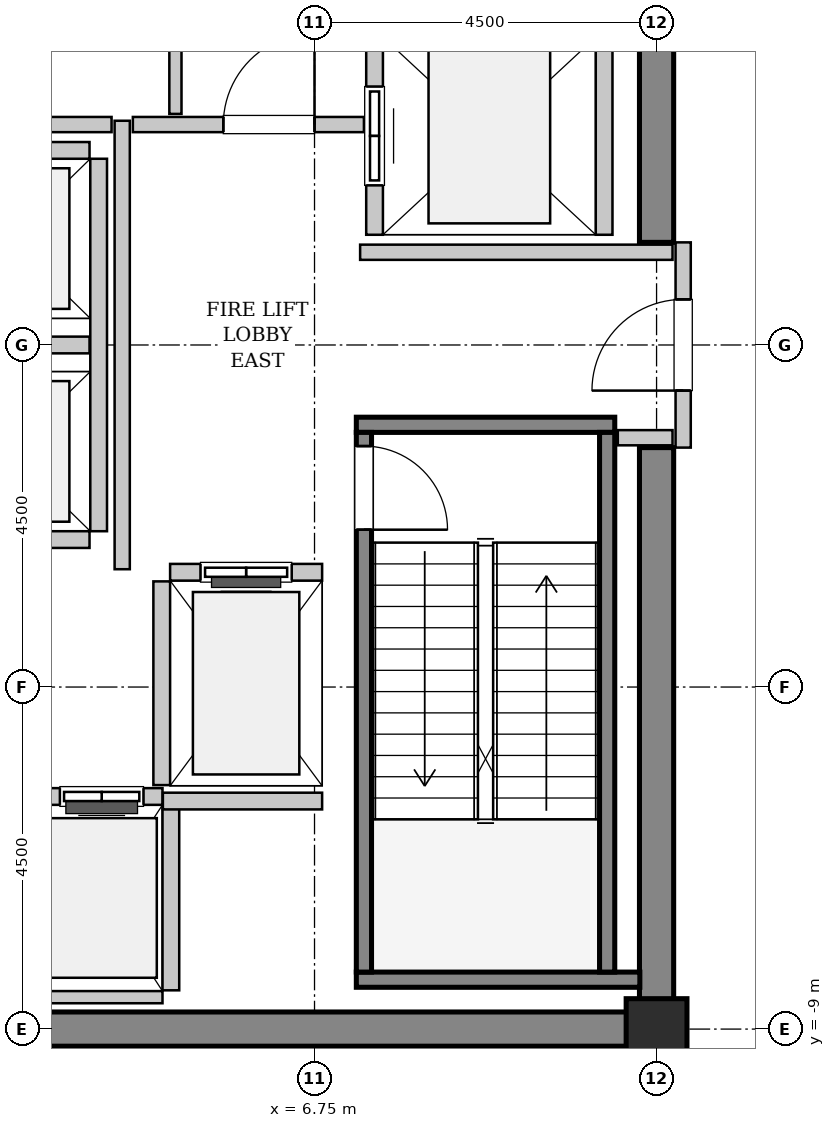
"""IFC4 building model, lengths in metres.
Left out: names, types, materials, properties, quantities, classifications, styles, units other than length and angle.
Written with IfcOpenShell. Run it as: python <this file> out.ifc"""

import sys

from ifc_helpers import new_model, si_unit, direction, frame, frame_2d, origin, origin_2d, place, context, subcontext, project, spatial, rectangle, hollow_rectangle, extrude, source, transform, mapped, element, fill, save


model = new_model("IFC4")
c1 = context("Model", 3, precision=1e-05, world=origin(), true_north=direction((0.0, 1.0)))
c2 = subcontext(c1, "Body", "Model", "MODEL_VIEW")
j1 = project(units=[si_unit("LENGTHUNIT", "METRE"), si_unit("PLANEANGLEUNIT", "RADIAN")], contexts=[c1])
p1 = place(None, origin())
s1 = spatial("IfcSite", under=j1, at=p1, CompositionType="ELEMENT")
p2 = place(p1, origin())
s2 = spatial("IfcBuilding", under=s1, at=p2, CompositionType="ELEMENT")
p3 = place(p2, frame((0.0, 0.0, 259.8)))
s3 = spatial("IfcBuildingStorey", under=s2, at=p3, CompositionType="ELEMENT", Elevation=259.8)
m1 = source(origin(), c2, "Body", "SweptSolid", [
    extrude(rectangle(XDim=9.925, YDim=0.45, at=frame_2d((4.962, 0.0))), origin(), (0.0, 0.0, 1.0), 4.8),
])
p4 = place(p3, frame((1.55, -9.0, 0.0), z_axis=(0.0, 0.0, 1.0), x_axis=(1.0, 0.0, 0.0)))
e1 = element("IfcWall", 1, at=p4, inside=s3, PredefinedType="SHEAR", context=c2, shape_type="MappedRepresentation", body=[
    mapped(m1, transform((0.0, 0.0, 0.0), x_axis=(1.0, 0.0, 0.0), y_axis=(0.0, 1.0, 0.0), z_axis=(0.0, 0.0, 1.0), scale=1.0)),
])
m2 = source(origin(), c2, "Body", "SweptSolid", [
    extrude(rectangle(XDim=7.425, YDim=0.45, at=frame_2d((3.712, 0.0))), origin(), (0.0, 0.0, 1.0), 4.8),
])
for number, where, z_axis, x_axis in (
    (2, (11.25, -8.775, 0.0), (0.0, 0.0, 1.0), (0.0, 1.0, 0.0)),
    (3, (11.25, 1.35, 0.0), (0.0, 0.0, 1.0), (0.0, 1.0, 0.0)),
):
    element("IfcWall", number, at=place(p3, frame(where, z_axis=z_axis, x_axis=x_axis)), inside=s3, PredefinedType="SHEAR", context=c2, shape_type="MappedRepresentation", body=[
        mapped(m2, transform((0.0, 0.0, 0.0), x_axis=(1.0, 0.0, 0.0), y_axis=(0.0, 1.0, 0.0), z_axis=(0.0, 0.0, 1.0), scale=1.0)),
    ])
m3 = source(origin(), c2, "Body", "SweptSolid", [
    extrude(hollow_rectangle(XDim=0.8, YDim=0.8, WallThickness=0.04, InnerFilletRadius=0.04, OuterFilletRadius=0.08, at=origin_2d()), origin(), (0.0, 0.0, 1.0), 4.8),
])
p5 = place(p3, frame((11.25, -9.0, 0.0), z_axis=(0.0, 0.0, 1.0), x_axis=(1.0, 0.0, 0.0)))
e4 = element("IfcColumn", 4, at=p5, inside=s3, PredefinedType="COLUMN", context=c2, shape_type="MappedRepresentation", body=[
    mapped(m3, transform((0.0, 0.0, 0.0), x_axis=(1.0, 0.0, 0.0), y_axis=(0.0, 1.0, 0.0), z_axis=(0.0, 0.0, 1.0), scale=1.0)),
])
m4 = source(origin(), c2, "Body", "SweptSolid", [
    extrude(rectangle(XDim=3.4, YDim=0.2, at=frame_2d((1.7, 0.0))), origin(), (0.0, 0.0, 1.0), 4.8),
])
p6 = place(p3, frame((7.3, -1.05, 0.0), z_axis=(0.0, 0.0, 1.0), x_axis=(1.0, 0.0, 0.0)))
e5 = element("IfcWall", 5, at=p6, inside=s3, PredefinedType="SOLIDWALL", context=c2, shape_type="MappedRepresentation", body=[
    mapped(m4, transform((0.0, 0.0, 0.0), x_axis=(1.0, 0.0, 0.0), y_axis=(0.0, 1.0, 0.0), z_axis=(0.0, 0.0, 1.0), scale=1.0)),
])
m5 = source(origin(), c2, "Body", "SweptSolid", [
    extrude(rectangle(XDim=3.73, YDim=0.2, at=frame_2d((1.865, 0.0))), origin(), (0.0, 0.0, 1.0), 4.8),
])
p7 = place(p3, frame((7.3, -8.35, 0.0), z_axis=(0.0, 0.0, 1.0), x_axis=(1.0, 0.0, 0.0)))
e6 = element("IfcWall", 6, at=p7, inside=s3, PredefinedType="SOLIDWALL", context=c2, shape_type="MappedRepresentation", body=[
    mapped(m5, transform((0.0, 0.0, 0.0), x_axis=(1.0, 0.0, 0.0), y_axis=(0.0, 1.0, 0.0), z_axis=(0.0, 0.0, 1.0), scale=1.0)),
])
m6 = source(origin(), c2, "Body", "SweptSolid", [
    extrude(rectangle(XDim=7.1, YDim=0.2, at=frame_2d((3.55, 0.0))), origin(), (0.0, 0.0, 1.0), 4.8),
])
p8 = place(p3, frame((7.4, -1.15, 0.0), z_axis=(0.0, 0.0, 1.0), x_axis=(0.0, -1.0, 0.0)))
e7 = element("IfcWall", 7, at=p8, inside=s3, PredefinedType="SOLIDWALL", context=c2, shape_type="MappedRepresentation", body=[
    mapped(m6, transform((0.0, 0.0, 0.0), x_axis=(1.0, 0.0, 0.0), y_axis=(0.0, 1.0, 0.0), z_axis=(0.0, 0.0, 1.0), scale=1.0)),
])
p9 = place(p8, frame((0.18, 0.0, 0.0)))
e8 = element("IfcOpeningElement", 8, at=p9, cuts=e7, PredefinedType="OPENING", context=c2, shape_type="SweptSolid", body=[
    extrude(rectangle(XDim=1.1, YDim=2.15, at=frame_2d((0.55, 1.075))), frame((0.0, 0.11, 0.0), z_axis=(0.0, -1.0, 0.0), x_axis=(1.0, 0.0, 0.0)), (0.0, 0.0, 1.0), 0.22),
])
p10 = place(p3, frame((10.6, -1.15, 0.0), z_axis=(0.0, 0.0, 1.0), x_axis=(0.0, -1.0, 0.0)))
e9 = element("IfcWall", 9, at=p10, inside=s3, PredefinedType="SOLIDWALL", context=c2, shape_type="MappedRepresentation", body=[
    mapped(m6, transform((0.0, 0.0, 0.0), x_axis=(1.0, 0.0, 0.0), y_axis=(0.0, 1.0, 0.0), z_axis=(0.0, 0.0, 1.0), scale=1.0)),
])
m7 = source(origin(), c2, "Body", "SweptSolid", [
    extrude(rectangle(XDim=2.0, YDim=0.22, at=frame_2d((1.0, 0.0))), origin(), (0.0, 0.0, 1.0), 4.535),
])
p11 = place(p3, frame((6.85, -2.99, 0.0), z_axis=(0.0, 0.0, 1.0), x_axis=(-1.0, 0.0, 0.0)))
e10 = element("IfcWall", 10, at=p11, inside=s3, PredefinedType="SOLIDWALL", context=c2, shape_type="MappedRepresentation", body=[
    mapped(m7, transform((0.0, 0.0, 0.0), x_axis=(1.0, 0.0, 0.0), y_axis=(0.0, 1.0, 0.0), z_axis=(0.0, 0.0, 1.0), scale=1.0)),
])
p12 = place(p11, frame((0.4, 0.0, 0.0)))
e11 = element("IfcOpeningElement", 11, at=p12, cuts=e10, PredefinedType="OPENING", context=c2, shape_type="SweptSolid", body=[
    extrude(rectangle(XDim=1.2, YDim=2.2, at=frame_2d((0.6, 1.1))), frame((0.0, 0.12, 0.0), z_axis=(0.0, -1.0, 0.0), x_axis=(1.0, 0.0, 0.0)), (0.0, 0.0, 1.0), 0.24),
])
m8 = source(origin(), c2, "Body", "SweptSolid", [
    extrude(rectangle(XDim=2.68, YDim=0.22, at=frame_2d((1.34, 0.0))), origin(), (0.0, 0.0, 1.0), 4.535),
])
p13 = place(p3, frame((4.74, -3.11, 0.0), z_axis=(0.0, 0.0, 1.0), x_axis=(0.0, -1.0, 0.0)))
e12 = element("IfcWall", 12, at=p13, inside=s3, PredefinedType="SOLIDWALL", context=c2, shape_type="MappedRepresentation", body=[
    mapped(m8, transform((0.0, 0.0, 0.0), x_axis=(1.0, 0.0, 0.0), y_axis=(0.0, 1.0, 0.0), z_axis=(0.0, 0.0, 1.0), scale=1.0)),
])
m9 = source(origin(), c2, "Body", "SweptSolid", [
    extrude(rectangle(XDim=5.45, YDim=0.22, at=frame_2d((2.725, 0.0))), origin(), (0.0, 0.0, 1.0), 4.535),
])
p14 = place(p3, frame((7.54, 6.9, 0.0), z_axis=(0.0, 0.0, 1.0), x_axis=(0.0, -1.0, 0.0)))
e13 = element("IfcWall", 13, at=p14, inside=s3, PredefinedType="SOLIDWALL", context=c2, shape_type="MappedRepresentation", body=[
    mapped(m9, transform((0.0, 0.0, 0.0), x_axis=(1.0, 0.0, 0.0), y_axis=(0.0, 1.0, 0.0), z_axis=(0.0, 0.0, 1.0), scale=1.0)),
])
p15 = place(p14, frame((3.5, 0.0, 0.0)))
e14 = element("IfcOpeningElement", 14, at=p15, cuts=e13, PredefinedType="OPENING", context=c2, shape_type="SweptSolid", body=[
    extrude(rectangle(XDim=1.3, YDim=2.3, at=frame_2d((0.65, 1.15))), frame((0.0, 0.12, 0.0), z_axis=(0.0, -1.0, 0.0), x_axis=(1.0, 0.0, 0.0)), (0.0, 0.0, 1.0), 0.24),
])
p16 = place(p14, frame((0.65, 0.0, 0.0)))
e15 = element("IfcOpeningElement", 15, at=p16, cuts=e13, PredefinedType="OPENING", context=c2, shape_type="SweptSolid", body=[
    extrude(rectangle(XDim=1.3, YDim=2.3, at=frame_2d((0.65, 1.15))), frame((0.0, 0.12, 0.0), z_axis=(0.0, -1.0, 0.0), x_axis=(1.0, 0.0, 0.0)), (0.0, 0.0, 1.0), 0.24),
])
p17 = place(p3, frame((10.56, 1.45, 0.0), z_axis=(0.0, 0.0, 1.0), x_axis=(0.0, 1.0, 0.0)))
e16 = element("IfcWall", 16, at=p17, inside=s3, PredefinedType="SOLIDWALL", context=c2, shape_type="MappedRepresentation", body=[
    mapped(m9, transform((0.0, 0.0, 0.0), x_axis=(1.0, 0.0, 0.0), y_axis=(0.0, 1.0, 0.0), z_axis=(0.0, 0.0, 1.0), scale=1.0)),
])
m10 = source(origin(), c2, "Body", "SweptSolid", [
    extrude(rectangle(XDim=3.2, YDim=0.22, at=frame_2d((1.6, 0.0))), origin(), (0.0, 0.0, 1.0), 4.535),
])
p18 = place(p3, frame((4.75, -5.94, 0.0), z_axis=(0.0, 0.0, 1.0), x_axis=(-1.0, 0.0, 0.0)))
e17 = element("IfcWall", 17, at=p18, inside=s3, PredefinedType="SOLIDWALL", context=c2, shape_type="MappedRepresentation", body=[
    mapped(m10, transform((0.0, 0.0, 0.0), x_axis=(1.0, 0.0, 0.0), y_axis=(0.0, 1.0, 0.0), z_axis=(0.0, 0.0, 1.0), scale=1.0)),
])
p19 = place(p18, frame((1.875, 0.0, 0.0)))
e18 = element("IfcOpeningElement", 18, at=p19, cuts=e17, PredefinedType="OPENING", context=c2, shape_type="SweptSolid", body=[
    extrude(rectangle(XDim=1.1, YDim=2.2, at=frame_2d((0.55, 1.1))), frame((0.0, 0.12, 0.0), z_axis=(0.0, -1.0, 0.0), x_axis=(1.0, 0.0, 0.0)), (0.0, 0.0, 1.0), 0.24),
])
p20 = place(p18, frame((0.25, 0.0, 0.0)))
e19 = element("IfcOpeningElement", 19, at=p20, cuts=e17, PredefinedType="OPENING", context=c2, shape_type="SweptSolid", body=[
    extrude(rectangle(XDim=1.1, YDim=2.2, at=frame_2d((0.55, 1.1))), frame((0.0, 0.12, 0.0), z_axis=(0.0, -1.0, 0.0), x_axis=(1.0, 0.0, 0.0)), (0.0, 0.0, 1.0), 0.24),
])
m11 = source(origin(), c2, "Body", "SweptSolid", [
    extrude(rectangle(XDim=3.2, YDim=0.16, at=frame_2d((1.6, 0.0))), origin(), (0.0, 0.0, 1.0), 3.625),
])
p21 = place(p3, frame((1.55, -8.58, 0.0), z_axis=(0.0, 0.0, 1.0), x_axis=(1.0, 0.0, 0.0)))
e20 = element("IfcWall", 20, at=p21, inside=s3, PredefinedType="PARTITIONING", context=c2, shape_type="MappedRepresentation", body=[
    mapped(m11, transform((0.0, 0.0, 0.0), x_axis=(1.0, 0.0, 0.0), y_axis=(0.0, 1.0, 0.0), z_axis=(0.0, 0.0, 1.0), scale=1.0)),
])
m12 = source(origin(), c2, "Body", "SweptSolid", [
    extrude(rectangle(XDim=2.43, YDim=0.22, at=frame_2d((1.215, 0.0))), origin(), (0.0, 0.0, 1.0), 4.535),
])
p22 = place(p3, frame((4.86, -8.49, 0.0), z_axis=(0.0, 0.0, 1.0), x_axis=(0.0, 1.0, 0.0)))
e21 = element("IfcWall", 21, at=p22, inside=s3, PredefinedType="SOLIDWALL", context=c2, shape_type="MappedRepresentation", body=[
    mapped(m12, transform((0.0, 0.0, 0.0), x_axis=(1.0, 0.0, 0.0), y_axis=(0.0, 1.0, 0.0), z_axis=(0.0, 0.0, 1.0), scale=1.0)),
])
m13 = source(origin(), c2, "Body", "SweptSolid", [
    extrude(rectangle(XDim=4.9, YDim=0.22, at=frame_2d((2.45, 0.0))), origin(), (0.0, 0.0, 1.0), 4.535),
])
p23 = place(p3, frame((3.91, -2.45, 0.0), z_axis=(0.0, 0.0, 1.0), x_axis=(0.0, 1.0, 0.0)))
e22 = element("IfcWall", 22, at=p23, inside=s3, PredefinedType="SOLIDWALL", context=c2, shape_type="MappedRepresentation", body=[
    mapped(m13, transform((0.0, 0.0, 0.0), x_axis=(1.0, 0.0, 0.0), y_axis=(0.0, 1.0, 0.0), z_axis=(0.0, 0.0, 1.0), scale=1.0)),
])
m14 = source(origin(), c2, "Body", "SweptSolid", [
    extrude(rectangle(XDim=2.13, YDim=0.22, at=frame_2d((1.065, 0.0))), origin(), (0.0, 0.0, 1.0), 4.535),
])
for number, where, z_axis, x_axis in (
    (23, (1.66, -2.56, 0.0), (0.0, 0.0, 1.0), (1.0, 0.0, 0.0)),
    (24, (1.66, 0.0, 0.0), (0.0, 0.0, 1.0), (1.0, 0.0, 0.0)),
    (25, (3.79, 2.56, 0.0), (0.0, 0.0, 1.0), (-1.0, 0.0, 0.0)),
):
    element("IfcWall", number, at=place(p3, frame(where, z_axis=z_axis, x_axis=x_axis)), inside=s3, PredefinedType="SOLIDWALL", context=c2, shape_type="MappedRepresentation", body=[
        mapped(m14, transform((0.0, 0.0, 0.0), x_axis=(1.0, 0.0, 0.0), y_axis=(0.0, 1.0, 0.0), z_axis=(0.0, 0.0, 1.0), scale=1.0)),
    ])
m15 = source(origin(), c2, "Body", "SweptSolid", [
    extrude(rectangle(XDim=2.095, YDim=0.22, at=frame_2d((1.048, 0.0))), origin(), (0.0, 0.0, 1.0), 4.535),
])
p24 = place(p3, frame((4.755, -6.0, 0.0), z_axis=(0.0, 0.0, 1.0), x_axis=(1.0, 0.0, 0.0)))
e26 = element("IfcWall", 26, at=p24, inside=s3, PredefinedType="SOLIDWALL", context=c2, shape_type="MappedRepresentation", body=[
    mapped(m15, transform((0.0, 0.0, 0.0), x_axis=(1.0, 0.0, 0.0), y_axis=(0.0, 1.0, 0.0), z_axis=(0.0, 0.0, 1.0), scale=1.0)),
])
m16 = source(origin(), c2, "Body", "SweptSolid", [
    extrude(rectangle(XDim=2.7, YDim=0.2, at=frame_2d((1.35, 0.0))), origin(), (0.0, 0.0, 1.0), 3.625),
])
p25 = place(p3, frame((11.6, -1.35, 0.0), z_axis=(0.0, 0.0, 1.0), x_axis=(0.0, 1.0, 0.0)))
e27 = element("IfcWall", 27, at=p25, inside=s3, PredefinedType="PARTITIONING", context=c2, shape_type="MappedRepresentation", body=[
    mapped(m16, transform((0.0, 0.0, 0.0), x_axis=(1.0, 0.0, 0.0), y_axis=(0.0, 1.0, 0.0), z_axis=(0.0, 0.0, 1.0), scale=1.0)),
])
p26 = place(p25, frame((0.75, 0.0, 0.0)))
e28 = element("IfcOpeningElement", 28, at=p26, cuts=e27, PredefinedType="OPENING", context=c2, shape_type="SweptSolid", body=[
    extrude(rectangle(XDim=1.2, YDim=2.15, at=frame_2d((0.6, 1.075))), frame((0.0, 0.11, 0.0), z_axis=(0.0, -1.0, 0.0), x_axis=(1.0, 0.0, 0.0)), (0.0, 0.0, 1.0), 0.22),
])
m17 = source(origin(), c2, "Body", "SweptSolid", [
    extrude(rectangle(XDim=5.9, YDim=0.2, at=frame_2d((2.95, 0.0))), origin(), (0.0, 0.0, 1.0), 4.535),
])
p27 = place(p3, frame((4.22, -2.95, 0.0), z_axis=(0.0, 0.0, 1.0), x_axis=(0.0, 1.0, 0.0)))
e29 = element("IfcWall", 29, at=p27, inside=s3, PredefinedType="PARTITIONING", context=c2, shape_type="MappedRepresentation", body=[
    mapped(m17, transform((0.0, 0.0, 0.0), x_axis=(1.0, 0.0, 0.0), y_axis=(0.0, 1.0, 0.0), z_axis=(0.0, 0.0, 1.0), scale=1.0)),
])
m18 = source(origin(), c2, "Body", "SweptSolid", [
    extrude(rectangle(XDim=2.52, YDim=0.2, at=frame_2d((1.26, 0.0))), origin(), (0.0, 0.0, 1.0), 4.535),
])
p28 = place(p3, frame((1.56, 2.9, 0.0), z_axis=(0.0, 0.0, 1.0), x_axis=(1.0, 0.0, 0.0)))
e30 = element("IfcWall", 30, at=p28, inside=s3, PredefinedType="PARTITIONING", context=c2, shape_type="MappedRepresentation", body=[
    mapped(m18, transform((0.0, 0.0, 0.0), x_axis=(1.0, 0.0, 0.0), y_axis=(0.0, 1.0, 0.0), z_axis=(0.0, 0.0, 1.0), scale=1.0)),
])
m19 = source(origin(), c2, "Body", "SweptSolid", [
    extrude(rectangle(XDim=3.04, YDim=0.2, at=frame_2d((1.52, 0.0))), origin(), (0.0, 0.0, 1.0), 4.535),
])
p29 = place(p3, frame((4.36, 2.9, 0.0), z_axis=(0.0, 0.0, 1.0), x_axis=(1.0, 0.0, 0.0)))
e31 = element("IfcWall", 31, at=p29, inside=s3, PredefinedType="PARTITIONING", context=c2, shape_type="MappedRepresentation", body=[
    mapped(m19, transform((0.0, 0.0, 0.0), x_axis=(1.0, 0.0, 0.0), y_axis=(0.0, 1.0, 0.0), z_axis=(0.0, 0.0, 1.0), scale=1.0)),
])
p30 = place(p29, frame((1.19, 0.0, 0.0)))
e32 = element("IfcOpeningElement", 32, at=p30, cuts=e31, PredefinedType="OPENING", context=c2, shape_type="SweptSolid", body=[
    extrude(rectangle(XDim=1.2, YDim=2.15, at=frame_2d((0.6, 1.075))), frame((0.0, 0.11, 0.0), z_axis=(0.0, -1.0, 0.0), x_axis=(1.0, 0.0, 0.0)), (0.0, 0.0, 1.0), 0.22),
])
m20 = source(origin(), c2, "Body", "SweptSolid", [
    extrude(rectangle(XDim=4.11, YDim=0.2, at=frame_2d((2.055, 0.0))), origin(), (0.0, 0.0, 1.0), 4.535),
])
p31 = place(p3, frame((7.35, 1.22, 0.0), z_axis=(0.0, 0.0, 1.0), x_axis=(1.0, 0.0, 0.0)))
e33 = element("IfcWall", 33, at=p31, inside=s3, PredefinedType="PARTITIONING", context=c2, shape_type="MappedRepresentation", body=[
    mapped(m20, transform((0.0, 0.0, 0.0), x_axis=(1.0, 0.0, 0.0), y_axis=(0.0, 1.0, 0.0), z_axis=(0.0, 0.0, 1.0), scale=1.0)),
])
m21 = source(origin(), c2, "Body", "SweptSolid", [
    extrude(rectangle(XDim=0.72, YDim=0.2, at=frame_2d((0.36, 0.0))), origin(), (0.0, 0.0, 1.0), 4.535),
])
p32 = place(p3, frame((10.74, -1.22, 0.0), z_axis=(0.0, 0.0, 1.0), x_axis=(1.0, 0.0, 0.0)))
e34 = element("IfcWall", 34, at=p32, inside=s3, PredefinedType="PARTITIONING", context=c2, shape_type="MappedRepresentation", body=[
    mapped(m21, transform((0.0, 0.0, 0.0), x_axis=(1.0, 0.0, 0.0), y_axis=(0.0, 1.0, 0.0), z_axis=(0.0, 0.0, 1.0), scale=1.0)),
])
m22 = source(origin(), c2, "Body", "SweptSolid", [
    extrude(rectangle(XDim=5.45, YDim=0.16, at=frame_2d((2.725, 0.0))), origin(), (0.0, 0.0, 1.0), 4.535),
])
p33 = place(p3, frame((4.92, 3.04, 0.0), z_axis=(0.0, 0.0, 1.0), x_axis=(0.0, 1.0, 0.0)))
e35 = element("IfcWall", 35, at=p33, inside=s3, PredefinedType="PARTITIONING", context=c2, shape_type="MappedRepresentation", body=[
    mapped(m22, transform((0.0, 0.0, 0.0), x_axis=(1.0, 0.0, 0.0), y_axis=(0.0, 1.0, 0.0), z_axis=(0.0, 0.0, 1.0), scale=1.0)),
])
m23 = source(origin(), c2, "Body", "SweptSolid", [
    extrude(rectangle(XDim=1.1, YDim=2.15, at=frame_2d((0.55, 1.075))), frame((0.0, 0.025, 0.0), z_axis=(0.0, -1.0, 0.0), x_axis=(1.0, 0.0, 0.0)), (0.0, 0.0, 1.0), 0.05),
])
p34 = place(p9, origin())
e36 = element("IfcDoor", 36, at=p34, inside=s3, OperationType="SINGLE_SWING_RIGHT", PredefinedType="DOOR", context=c2, shape_type="MappedRepresentation", body=[
    mapped(m23, transform((0.0, 0.0, 0.0), x_axis=(1.0, 0.0, 0.0), y_axis=(0.0, 1.0, 0.0), z_axis=(0.0, 0.0, 1.0), scale=1.0)),
])
fill(e8, e36)
m24 = source(origin(), c2, "Body", "SweptSolid", [
    extrude(rectangle(XDim=1.2, YDim=2.2, at=frame_2d((0.6, 1.1))), frame((0.0, 0.025, 0.0), z_axis=(0.0, -1.0, 0.0), x_axis=(1.0, 0.0, 0.0)), (0.0, 0.0, 1.0), 0.05),
])
p35 = place(p12, origin())
e37 = element("IfcDoor", 37, at=p35, inside=s3, OperationType="SLIDING_TO_LEFT", PredefinedType="DOOR", context=c2, shape_type="MappedRepresentation", body=[
    mapped(m24, transform((0.0, 0.0, 0.0), x_axis=(1.0, 0.0, 0.0), y_axis=(0.0, 1.0, 0.0), z_axis=(0.0, 0.0, 1.0), scale=1.0)),
])
fill(e11, e37)
m25 = source(origin(), c2, "Body", "SweptSolid", [
    extrude(rectangle(XDim=1.3, YDim=2.3, at=frame_2d((0.65, 1.15))), frame((0.0, 0.025, 0.0), z_axis=(0.0, -1.0, 0.0), x_axis=(1.0, 0.0, 0.0)), (0.0, 0.0, 1.0), 0.05),
])
p36 = place(p15, origin())
e38 = element("IfcDoor", 38, at=p36, inside=s3, OperationType="SLIDING_TO_RIGHT", PredefinedType="DOOR", context=c2, shape_type="MappedRepresentation", body=[
    mapped(m25, transform((0.0, 0.0, 0.0), x_axis=(1.0, 0.0, 0.0), y_axis=(0.0, 1.0, 0.0), z_axis=(0.0, 0.0, 1.0), scale=1.0)),
])
fill(e14, e38)
m26 = source(origin(), c2, "Body", "SweptSolid", [
    extrude(rectangle(XDim=1.1, YDim=2.2, at=frame_2d((0.55, 1.1))), frame((0.0, 0.025, 0.0), z_axis=(0.0, -1.0, 0.0), x_axis=(1.0, 0.0, 0.0)), (0.0, 0.0, 1.0), 0.05),
])
p37 = place(p20, origin())
e39 = element("IfcDoor", 39, at=p37, inside=s3, OperationType="DOUBLE_DOOR_SLIDING", PredefinedType="DOOR", context=c2, shape_type="MappedRepresentation", body=[
    mapped(m26, transform((0.0, 0.0, 0.0), x_axis=(1.0, 0.0, 0.0), y_axis=(0.0, 1.0, 0.0), z_axis=(0.0, 0.0, 1.0), scale=1.0)),
])
fill(e19, e39)
m27 = source(origin(), c2, "Body", "SweptSolid", [
    extrude(rectangle(XDim=1.2, YDim=2.15, at=frame_2d((0.6, 1.075))), frame((0.0, 0.025, 0.0), z_axis=(0.0, -1.0, 0.0), x_axis=(1.0, 0.0, 0.0)), (0.0, 0.0, 1.0), 0.05),
])
p38 = place(p26, origin())
e40 = element("IfcDoor", 40, at=p38, inside=s3, OperationType="SINGLE_SWING_LEFT", PredefinedType="DOOR", context=c2, shape_type="MappedRepresentation", body=[
    mapped(m27, transform((0.0, 0.0, 0.0), x_axis=(1.0, 0.0, 0.0), y_axis=(0.0, 1.0, 0.0), z_axis=(0.0, 0.0, 1.0), scale=1.0)),
])
fill(e28, e40)
p39 = place(p30, origin())
e41 = element("IfcDoor", 41, at=p39, inside=s3, OperationType="SINGLE_SWING_RIGHT", PredefinedType="DOOR", context=c2, shape_type="MappedRepresentation", body=[
    mapped(m27, transform((0.0, 0.0, 0.0), x_axis=(1.0, 0.0, 0.0), y_axis=(0.0, 1.0, 0.0), z_axis=(0.0, 0.0, 1.0), scale=1.0)),
])
fill(e32, e41)
save(model, sys.argv[1])
